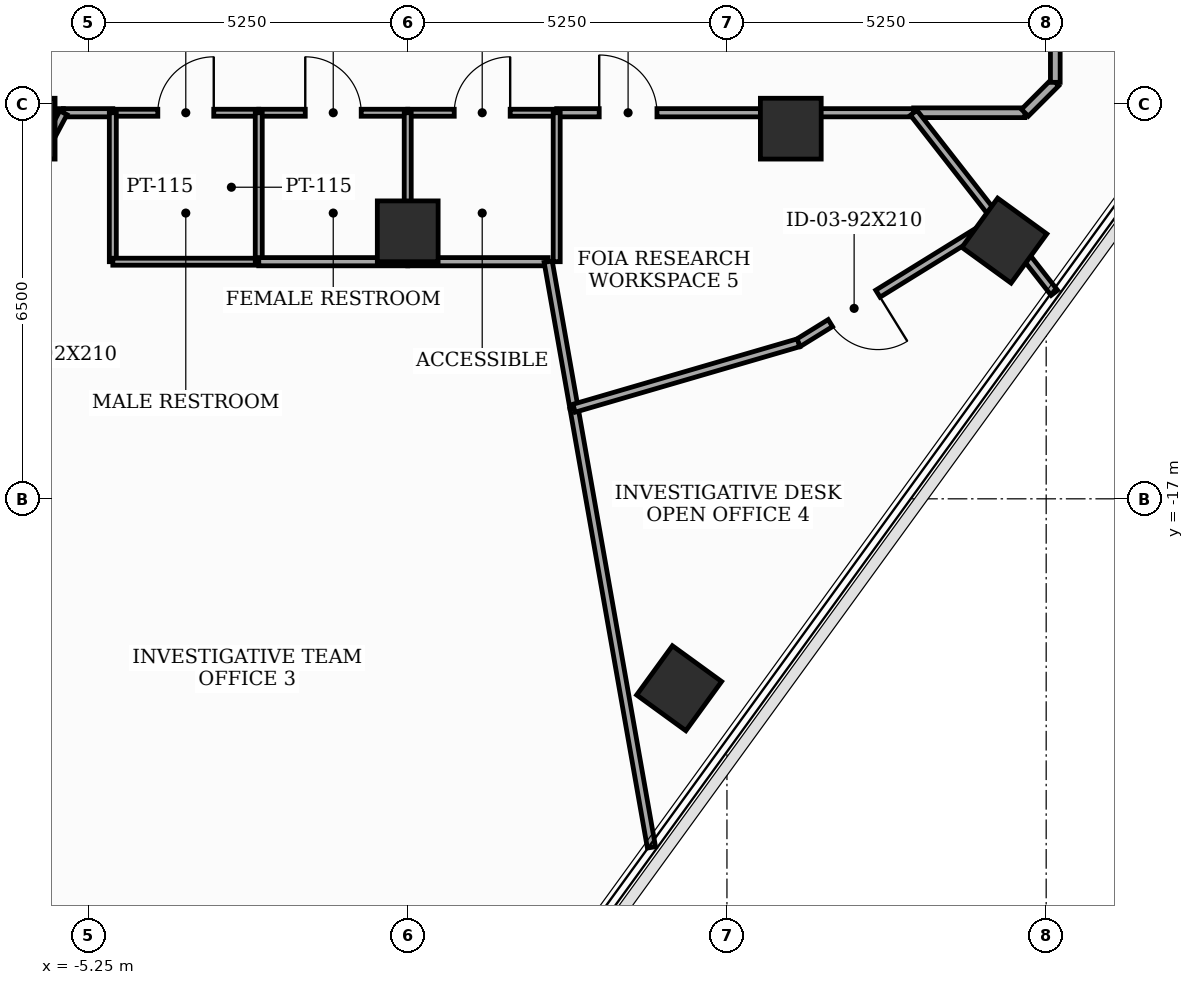
"""IFC4 building model, lengths in metres.
Left out: names, types, materials, properties, quantities, classifications, styles, units other than length and angle.
Written with IfcOpenShell. Run it as: python <this file> out.ifc"""

import sys

from ifc_helpers import new_model, si_unit, direction, frame, frame_2d, origin, origin_2d, place, context, subcontext, project, spatial, rectangle, extrude, element, fill, save


model = new_model("IFC4")
c1 = context("Model", 3, precision=1e-05, world=origin(), true_north=direction((0.0, 1.0)))
c2 = subcontext(c1, "Body", "Model", "MODEL_VIEW")
j1 = project(units=[si_unit("LENGTHUNIT", "METRE"), si_unit("PLANEANGLEUNIT", "RADIAN")], contexts=[c1])
p1 = place(None, origin())
s1 = spatial("IfcSite", under=j1, at=p1, CompositionType="ELEMENT")
p2 = place(p1, origin())
s2 = spatial("IfcBuilding", under=s1, at=p2, CompositionType="ELEMENT")
p3 = place(p2, frame((0.0, 0.0, 230.0)))
s3 = spatial("IfcBuildingStorey", under=s2, at=p3, CompositionType="ELEMENT", Elevation=230.0)
for number, where, z_axis, x_axis in (
    (1, (-6.3, -10.912, 0.0), (0.0, 0.0, 1.0), (1.0, 0.0, 0.0)),
    (2, (0.0, -12.6, 0.0), (0.0, 0.0, 1.0), (1.0, 0.0, 0.0)),
    (3, (6.3, -10.912, 0.0), (0.0, 0.0, 1.0), (1.0, 0.0, 0.0)),
    (4, (4.464, -20.115, 0.0), (0.0, 0.0, 1.0), (0.588, 0.809, 0.0)),
    (5, (9.812, -12.753, 0.0), (0.0, 0.0, 1.0), (0.588, 0.809, 0.0)),
):
    element("IfcColumn", number, at=place(p3, frame(where, z_axis=z_axis, x_axis=x_axis)), inside=s3, PredefinedType="COLUMN", context=c2, shape_type="SweptSolid", body=[
        extrude(rectangle(XDim=1.0, YDim=1.0, at=origin_2d()), origin(), (0.0, 0.0, 1.0), 3.7),
    ])
p4 = place(p3, frame((-10.15, -10.65, 0.0), z_axis=(0.0, 0.0, 1.0), x_axis=(1.0, 0.0, 0.0)))
e6 = element("IfcWall", 6, at=p4, inside=s3, PredefinedType="PARTITIONING", context=c2, shape_type="SweptSolid", body=[
    extrude(rectangle(XDim=4.487, YDim=0.135, at=frame_2d((2.243, 0.0))), origin(), (0.0, 0.0, 1.0), 2.885),
])
p5 = place(p4, frame((0.781, 0.0, 0.0)))
e7 = element("IfcOpeningElement", 7, at=p5, cuts=e6, PredefinedType="OPENING", context=c2, shape_type="SweptSolid", body=[
    extrude(rectangle(XDim=0.95, YDim=2.1, at=frame_2d((0.475, 1.05))), frame((0.0, 0.077, 0.0), z_axis=(0.0, -1.0, 0.0), x_axis=(1.0, 0.0, 0.0)), (0.0, 0.0, 1.0), 0.155),
])
p6 = place(p3, frame((-4.85, -10.65, 0.0), z_axis=(0.0, 0.0, 1.0), x_axis=(1.0, 0.0, 0.0)))
e8 = element("IfcWall", 8, at=p6, inside=s3, PredefinedType="PARTITIONING", context=c2, shape_type="SweptSolid", body=[
    extrude(rectangle(XDim=2.4, YDim=0.115, at=frame_2d((1.2, 0.0))), origin(), (0.0, 0.0, 1.0), 3.5),
])
p7 = place(p6, frame((0.74, 0.0, 0.0)))
e9 = element("IfcOpeningElement", 9, at=p7, cuts=e8, PredefinedType="OPENING", context=c2, shape_type="SweptSolid", body=[
    extrude(rectangle(XDim=0.92, YDim=2.1, at=frame_2d((0.46, 1.05))), frame((0.0, 0.067, 0.0), z_axis=(0.0, -1.0, 0.0), x_axis=(1.0, 0.0, 0.0)), (0.0, 0.0, 1.0), 0.135),
])
p8 = place(p3, frame((-5.663, -10.65, 0.0), z_axis=(0.0, 0.0, 1.0), x_axis=(1.0, 0.0, 0.0)))
e10 = element("IfcWall", 10, at=p8, inside=s3, PredefinedType="PARTITIONING", context=c2, shape_type="SweptSolid", body=[
    extrude(rectangle(XDim=0.813, YDim=0.135, at=frame_2d((0.406, 0.0))), origin(), (0.0, 0.0, 1.0), 3.5),
])
p9 = place(p3, frame((-2.45, -10.65, 0.0), z_axis=(0.0, 0.0, 1.0), x_axis=(1.0, 0.0, 0.0)))
e11 = element("IfcWall", 11, at=p9, inside=s3, PredefinedType="PARTITIONING", context=c2, shape_type="SweptSolid", body=[
    extrude(rectangle(XDim=2.45, YDim=0.115, at=frame_2d((1.225, 0.0))), origin(), (0.0, 0.0, 1.0), 2.885),
])
p10 = place(p9, frame((0.765, 0.0, 0.0)))
e12 = element("IfcOpeningElement", 12, at=p10, cuts=e11, PredefinedType="OPENING", context=c2, shape_type="SweptSolid", body=[
    extrude(rectangle(XDim=0.92, YDim=2.1, at=frame_2d((0.46, 1.05))), frame((0.0, 0.067, 0.0), z_axis=(0.0, -1.0, 0.0), x_axis=(1.0, 0.0, 0.0)), (0.0, 0.0, 1.0), 0.135),
])
p11 = place(p3, frame((0.0, -10.65, 0.0), z_axis=(0.0, 0.0, 1.0), x_axis=(1.0, 0.0, 0.0)))
e13 = element("IfcWall", 13, at=p11, inside=s3, PredefinedType="PARTITIONING", context=c2, shape_type="SweptSolid", body=[
    extrude(rectangle(XDim=2.45, YDim=0.115, at=frame_2d((1.225, 0.0))), origin(), (0.0, 0.0, 1.0), 3.5),
])
p12 = place(p11, frame((0.765, 0.0, 0.0)))
e14 = element("IfcOpeningElement", 14, at=p12, cuts=e13, PredefinedType="OPENING", context=c2, shape_type="SweptSolid", body=[
    extrude(rectangle(XDim=0.92, YDim=2.1, at=frame_2d((0.46, 1.05))), frame((0.0, 0.067, 0.0), z_axis=(0.0, -1.0, 0.0), x_axis=(1.0, 0.0, 0.0)), (0.0, 0.0, 1.0), 0.135),
])
p13 = place(p3, frame((2.45, -10.65, 0.0), z_axis=(0.0, 0.0, 1.0), x_axis=(1.0, 0.0, 0.0)))
e15 = element("IfcWall", 15, at=p13, inside=s3, PredefinedType="PARTITIONING", context=c2, shape_type="SweptSolid", body=[
    extrude(rectangle(XDim=5.871, YDim=0.135, at=frame_2d((2.936, 0.0))), origin(), (0.0, 0.0, 1.0), 2.885),
])
p14 = place(p13, frame((0.699, 0.0, 0.0)))
e16 = element("IfcOpeningElement", 16, at=p14, cuts=e15, PredefinedType="OPENING", context=c2, shape_type="SweptSolid", body=[
    extrude(rectangle(XDim=0.95, YDim=2.1, at=frame_2d((0.475, 1.05))), frame((0.0, 0.077, 0.0), z_axis=(0.0, -1.0, 0.0), x_axis=(1.0, 0.0, 0.0)), (0.0, 0.0, 1.0), 0.155),
])
p15 = place(p3, frame((8.321, -10.65, 0.0), z_axis=(0.0, 0.0, 1.0), x_axis=(1.0, 0.0, 0.0)))
e17 = element("IfcWall", 17, at=p15, inside=s3, PredefinedType="PARTITIONING", context=c2, shape_type="SweptSolid", body=[
    extrude(rectangle(XDim=1.829, YDim=0.16, at=frame_2d((0.915, 0.0))), origin(), (0.0, 0.0, 1.0), 3.5),
])
p16 = place(p3, frame((10.15, -10.65, 0.0), z_axis=(0.0, 0.0, 1.0), x_axis=(0.707106781187, 0.707106781187, 0.0)))
e18 = element("IfcWall", 18, at=p16, inside=s3, PredefinedType="PARTITIONING", context=c2, shape_type="SweptSolid", body=[
    extrude(rectangle(XDim=0.707, YDim=0.16, at=frame_2d((0.354, 0.0))), origin(), (0.0, 0.0, 1.0), 3.5),
])
p17 = place(p3, frame((10.65, -10.15, 0.0), z_axis=(0.0, 0.0, 1.0), x_axis=(0.0, 1.0, 0.0)))
e19 = element("IfcWall", 19, at=p17, inside=s3, PredefinedType="PARTITIONING", context=c2, shape_type="SweptSolid", body=[
    extrude(rectangle(XDim=5.408, YDim=0.16, at=frame_2d((2.704, 0.0))), origin(), (0.0, 0.0, 1.0), 2.885),
])
p18 = place(p17, frame((0.582, 0.0, 0.0)))
e20 = element("IfcOpeningElement", 20, at=p18, cuts=e19, PredefinedType="OPENING", context=c2, shape_type="SweptSolid", body=[
    extrude(rectangle(XDim=1.0, YDim=2.15, at=frame_2d((0.5, 1.075))), frame((0.0, 0.09, 0.0), z_axis=(0.0, -1.0, 0.0), x_axis=(1.0, 0.0, 0.0)), (0.0, 0.0, 1.0), 0.18),
])
p19 = place(p3, frame((-9.893, -18.605, 0.0), z_axis=(0.0, 0.0, 1.0), x_axis=(0.469478145305, 0.88294409284, 0.0)))
e21 = element("IfcWall", 21, at=p19, inside=s3, PredefinedType="PARTITIONING", context=c2, shape_type="SweptSolid", body=[
    extrude(rectangle(XDim=9.01, YDim=0.135, at=frame_2d((4.505, 0.0))), origin(), (0.0, 0.0, 1.0), 2.885),
])
p20 = place(p19, frame((4.045, 0.0, 0.0)))
e22 = element("IfcOpeningElement", 22, at=p20, cuts=e21, PredefinedType="OPENING", context=c2, shape_type="SweptSolid", body=[
    extrude(rectangle(XDim=0.92, YDim=2.1, at=frame_2d((0.46, 1.05))), frame((0.0, 0.077, 0.0), z_axis=(0.0, -1.0, 0.0), x_axis=(1.0, 0.0, 0.0)), (0.0, 0.0, 1.0), 0.155),
])
p21 = place(p3, frame((-4.85, -10.65, 0.0), z_axis=(0.0, 0.0, 1.0), x_axis=(0.0, -1.0, 0.0)))
e23 = element("IfcWall", 23, at=p21, inside=s3, PredefinedType="PARTITIONING", context=c2, shape_type="SweptSolid", body=[
    extrude(rectangle(XDim=2.45, YDim=0.115, at=frame_2d((1.225, 0.0))), origin(), (0.0, 0.0, 1.0), 2.885),
])
p22 = place(p3, frame((-4.85, -13.1, 0.0), z_axis=(0.0, 0.0, 1.0), x_axis=(1.0, 0.0, 0.0)))
e24 = element("IfcWall", 24, at=p22, inside=s3, PredefinedType="PARTITIONING", context=c2, shape_type="SweptSolid", body=[
    extrude(rectangle(XDim=2.4, YDim=0.115, at=frame_2d((1.2, 0.0))), origin(), (0.0, 0.0, 1.0), 3.5),
])
p23 = place(p3, frame((-2.45, -13.1, 0.0), z_axis=(0.0, 0.0, 1.0), x_axis=(0.0, 1.0, 0.0)))
e25 = element("IfcWall", 25, at=p23, inside=s3, PredefinedType="PARTITIONING", context=c2, shape_type="SweptSolid", body=[
    extrude(rectangle(XDim=2.45, YDim=0.115, at=frame_2d((1.225, 0.0))), origin(), (0.0, 0.0, 1.0), 2.885),
])
p24 = place(p3, frame((0.0, -13.1, 0.0), z_axis=(0.0, 0.0, 1.0), x_axis=(-1.0, 0.0, 0.0)))
e26 = element("IfcWall", 26, at=p24, inside=s3, PredefinedType="PARTITIONING", context=c2, shape_type="SweptSolid", body=[
    extrude(rectangle(XDim=2.45, YDim=0.135, at=frame_2d((1.225, 0.0))), origin(), (0.0, 0.0, 1.0), 3.5),
])
p25 = place(p3, frame((2.31, -13.1, 0.0), z_axis=(0.0, 0.0, 1.0), x_axis=(-1.0, 0.0, 0.0)))
e27 = element("IfcWall", 27, at=p25, inside=s3, PredefinedType="PARTITIONING", context=c2, shape_type="SweptSolid", body=[
    extrude(rectangle(XDim=2.31, YDim=0.135, at=frame_2d((1.155, 0.0))), origin(), (0.0, 0.0, 1.0), 2.985),
])
p26 = place(p3, frame((4.009, -22.732, 0.0), z_axis=(0.0, 0.0, 1.0), x_axis=(-0.173639103053, 0.984809353068, 0.0)))
e28 = element("IfcWall", 28, at=p26, inside=s3, PredefinedType="PARTITIONING", context=c2, shape_type="SweptSolid", body=[
    extrude(rectangle(XDim=7.334, YDim=0.135, at=frame_2d((3.667, 0.0))), origin(), (0.0, 0.0, 1.0), 2.985),
])
p27 = place(p3, frame((2.735, -15.51, 0.0), z_axis=(0.0, 0.0, 1.0), x_axis=(-0.173694270709, 0.984799624453, 0.0)))
e29 = element("IfcWall", 29, at=p27, inside=s3, PredefinedType="PARTITIONING", context=c2, shape_type="SweptSolid", body=[
    extrude(rectangle(XDim=2.447, YDim=0.135, at=frame_2d((1.224, 0.0))), origin(), (0.0, 0.0, 1.0), 3.5),
])
for number, where, z_axis, x_axis in (
    (30, (0.0, -13.1, 0.0), (0.0, 0.0, 1.0), (0.0, 1.0, 0.0)),
    (31, (2.45, -13.1, 0.0), (0.0, 0.0, 1.0), (0.0, 1.0, 0.0)),
):
    element("IfcWall", number, at=place(p3, frame(where, z_axis=z_axis, x_axis=x_axis)), inside=s3, PredefinedType="PARTITIONING", context=c2, shape_type="SweptSolid", body=[
        extrude(rectangle(XDim=2.45, YDim=0.115, at=frame_2d((1.225, 0.0))), origin(), (0.0, 0.0, 1.0), 2.885),
    ])
p28 = place(p3, frame((9.696, -12.411, 0.0), z_axis=(0.0, 0.0, 1.0), x_axis=(-0.850393663863, -0.526146953295, 0.0)))
e32 = element("IfcWall", 32, at=p28, inside=s3, PredefinedType="PARTITIONING", context=c2, shape_type="SweptSolid", body=[
    extrude(rectangle(XDim=3.845, YDim=0.135, at=frame_2d((1.923, 0.0))), origin(), (0.0, 0.0, 1.0), 2.985),
])
p29 = place(p28, frame((2.309, 0.0, 0.0)))
e33 = element("IfcOpeningElement", 33, at=p29, cuts=e32, PredefinedType="OPENING", context=c2, shape_type="SweptSolid", body=[
    extrude(rectangle(XDim=0.92, YDim=2.1, at=frame_2d((0.46, 1.05))), frame((0.0, 0.077, 0.0), z_axis=(0.0, -1.0, 0.0), x_axis=(1.0, 0.0, 0.0)), (0.0, 0.0, 1.0), 0.155),
])
p30 = place(p3, frame((6.426, -14.434, 0.0), z_axis=(0.0, 0.0, 1.0), x_axis=(-0.960041241254, -0.279858562654, 0.0)))
e34 = element("IfcWall", 34, at=p30, inside=s3, PredefinedType="PARTITIONING", context=c2, shape_type="SweptSolid", body=[
    extrude(rectangle(XDim=3.844, YDim=0.135, at=frame_2d((1.922, 0.0))), origin(), (0.0, 0.0, 1.0), 3.5),
])
p31 = place(p3, frame((10.635, -13.612, 0.0), z_axis=(0.0, 0.0, 1.0), x_axis=(-0.615768345532, 0.787927245779, 0.0)))
e35 = element("IfcWall", 35, at=p31, inside=s3, PredefinedType="PARTITIONING", context=c2, shape_type="SweptSolid", body=[
    extrude(rectangle(XDim=1.524, YDim=0.135, at=frame_2d((0.762, 0.0))), origin(), (0.0, 0.0, 1.0), 2.985),
])
p32 = place(p3, frame((9.696, -12.411, 0.0), z_axis=(0.0, 0.0, 1.0), x_axis=(-0.615429845305, 0.788191668002, 0.0)))
e36 = element("IfcWall", 36, at=p32, inside=s3, PredefinedType="PARTITIONING", context=c2, shape_type="SweptSolid", body=[
    extrude(rectangle(XDim=2.234, YDim=0.135, at=frame_2d((1.117, 0.0))), origin(), (0.0, 0.0, 1.0), 2.985),
])
p33 = place(p7, origin())
e37 = element("IfcDoor", 37, at=p33, inside=s3, OperationType="SINGLE_SWING_RIGHT", PredefinedType="DOOR", context=c2, shape_type="SweptSolid", body=[
    extrude(rectangle(XDim=0.92, YDim=2.1, at=frame_2d((0.46, 1.05))), frame((0.0, 0.025, 0.0), z_axis=(0.0, -1.0, 0.0), x_axis=(1.0, 0.0, 0.0)), (0.0, 0.0, 1.0), 0.05),
])
fill(e9, e37)
p34 = place(p10, origin())
e38 = element("IfcDoor", 38, at=p34, inside=s3, OperationType="SINGLE_SWING_LEFT", PredefinedType="DOOR", context=c2, shape_type="SweptSolid", body=[
    extrude(rectangle(XDim=0.92, YDim=2.1, at=frame_2d((0.46, 1.05))), frame((0.0, 0.025, 0.0), z_axis=(0.0, -1.0, 0.0), x_axis=(1.0, 0.0, 0.0)), (0.0, 0.0, 1.0), 0.05),
])
fill(e12, e38)
p35 = place(p12, origin())
e39 = element("IfcDoor", 39, at=p35, inside=s3, OperationType="SINGLE_SWING_RIGHT", PredefinedType="DOOR", context=c2, shape_type="SweptSolid", body=[
    extrude(rectangle(XDim=0.92, YDim=2.1, at=frame_2d((0.46, 1.05))), frame((0.0, 0.025, 0.0), z_axis=(0.0, -1.0, 0.0), x_axis=(1.0, 0.0, 0.0)), (0.0, 0.0, 1.0), 0.05),
])
fill(e14, e39)
p36 = place(p14, origin())
e40 = element("IfcDoor", 40, at=p36, inside=s3, OperationType="SINGLE_SWING_LEFT", PredefinedType="DOOR", context=c2, shape_type="SweptSolid", body=[
    extrude(rectangle(XDim=0.95, YDim=2.1, at=frame_2d((0.475, 1.05))), frame((0.0, 0.025, 0.0), z_axis=(0.0, -1.0, 0.0), x_axis=(1.0, 0.0, 0.0)), (0.0, 0.0, 1.0), 0.05),
])
fill(e16, e40)
p37 = place(p29, origin())
e41 = element("IfcDoor", 41, at=p37, inside=s3, OperationType="SINGLE_SWING_LEFT", PredefinedType="DOOR", context=c2, shape_type="SweptSolid", body=[
    extrude(rectangle(XDim=0.92, YDim=2.1, at=frame_2d((0.46, 1.05))), frame((0.0, 0.025, 0.0), z_axis=(0.0, -1.0, 0.0), x_axis=(1.0, 0.0, 0.0)), (0.0, 0.0, 1.0), 0.05),
])
fill(e33, e41)
save(model, sys.argv[1])
